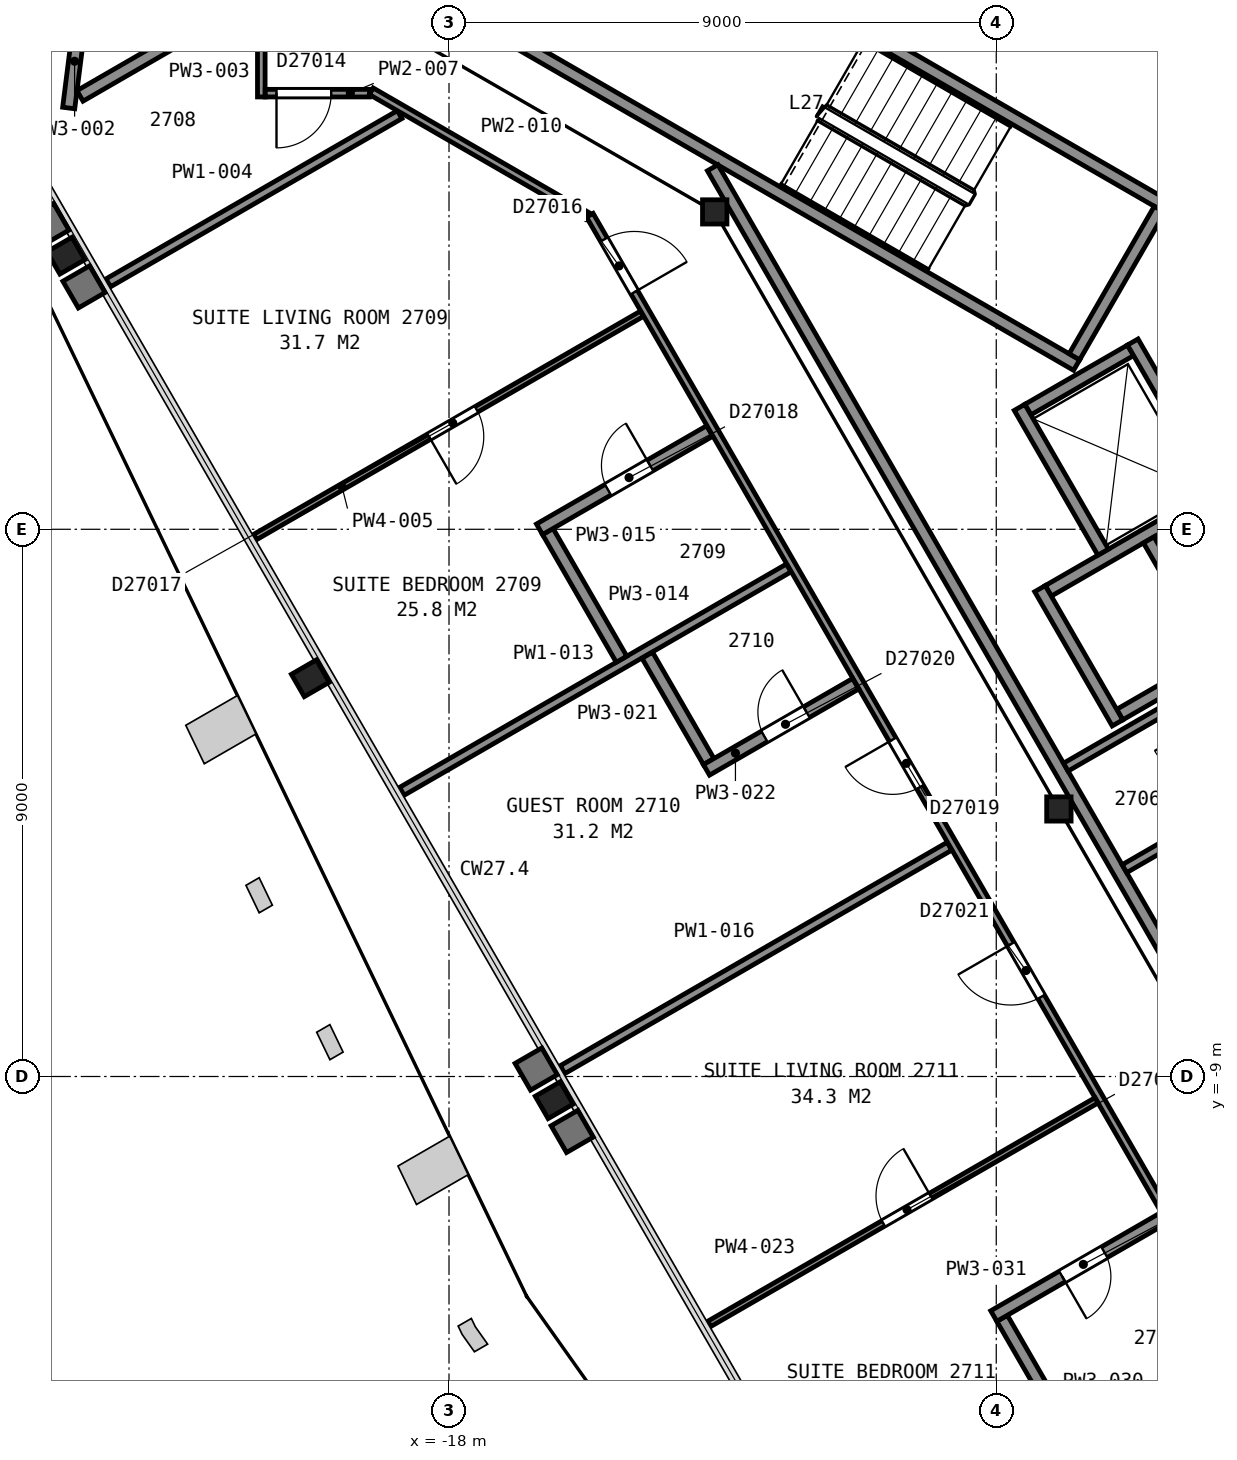
"""IFC4 building model, lengths in metres.
Left out: names, types, materials, properties, quantities, classifications, styles, units other than length and angle.
Written with IfcOpenShell. Run it as: python <this file> out.ifc"""

import sys

from ifc_helpers import new_model, si_unit, direction, frame, frame_2d, origin, origin_2d, place, context, subcontext, project, spatial, rectangle, i_section, extrude, element, fill, save


model = new_model("IFC4")
c1 = context("Model", 3, precision=1e-05, world=origin(), true_north=direction((0.0, 1.0)))
c2 = subcontext(c1, "Body", "Model", "MODEL_VIEW")
j1 = project(units=[si_unit("LENGTHUNIT", "METRE"), si_unit("PLANEANGLEUNIT", "RADIAN")], contexts=[c1])
p1 = place(None, origin())
s1 = spatial("IfcSite", under=j1, at=p1, CompositionType="ELEMENT")
p2 = place(p1, origin())
s2 = spatial("IfcBuilding", under=s1, at=p2, CompositionType="ELEMENT")
p3 = place(p2, frame((0.0, 0.0, 114.4)))
s3 = spatial("IfcBuildingStorey", under=s2, at=p3, CompositionType="ELEMENT", Elevation=114.4)
p4 = place(p3, frame((-24.3, 4.5, 0.0), z_axis=(0.0, 0.0, 1.0), x_axis=(-0.5, 0.866025403784, 0.0)))
e1 = element("IfcColumn", 1, at=p4, inside=s3, PredefinedType="COLUMN", context=c2, shape_type="SweptSolid", body=[
    extrude(i_section(OverallWidth=0.424, OverallDepth=0.475, WebThickness=0.048, FlangeThickness=0.077, FilletRadius=0.015, at=origin_2d()), origin(), (0.0, 0.0, 1.0), 3.555),
])
p5 = place(p3, frame((-20.28, -2.45, 0.0), z_axis=(0.0, 0.0, 1.0), x_axis=(-0.5, 0.866025403784, 0.0)))
e2 = element("IfcColumn", 2, at=p5, inside=s3, PredefinedType="COLUMN", context=c2, shape_type="SweptSolid", body=[
    extrude(i_section(OverallWidth=0.424, OverallDepth=0.475, WebThickness=0.048, FlangeThickness=0.077, FilletRadius=0.015, at=origin_2d()), origin(), (0.0, 0.0, 1.0), 3.56),
])
p6 = place(p3, frame((-16.27, -9.39, 0.0), z_axis=(0.0, 0.0, 1.0), x_axis=(-0.5, 0.866025403784, 0.0)))
e3 = element("IfcColumn", 3, at=p6, inside=s3, PredefinedType="COLUMN", context=c2, shape_type="SweptSolid", body=[
    extrude(i_section(OverallWidth=0.424, OverallDepth=0.475, WebThickness=0.048, FlangeThickness=0.077, FilletRadius=0.015, at=origin_2d()), origin(), (0.0, 0.0, 1.0), 3.565),
])
for number, where, z_axis, x_axis in (
    (4, (-13.63, 5.22, 0.0), (0.0, 0.0, 1.0), (1.0, 0.0, 0.0)),
    (5, (-7.97, -4.6, 0.0), (0.0, 0.0, 1.0), (1.0, 0.0, 0.0)),
):
    element("IfcColumn", number, at=place(p3, frame(where, z_axis=z_axis, x_axis=x_axis)), inside=s3, PredefinedType="COLUMN", context=c2, shape_type="SweptSolid", body=[
        extrude(i_section(OverallWidth=0.401, OverallDepth=0.399, WebThickness=0.025, FlangeThickness=0.04, FilletRadius=0.015, at=origin_2d()), origin(), (0.0, 0.0, 1.0), 3.6),
    ])
for number, where, z_axis, x_axis in (
    (6, (-7.678, 2.701, 0.0), (0.0, 0.0, 1.0), (-0.866, 0.5, 0.0)),
    (7, (-6.178, 5.299, 0.0), (0.0, 0.0, 1.0), (-0.866, 0.5, 0.0)),
):
    element("IfcWall", number, at=place(p3, frame(where, z_axis=z_axis, x_axis=x_axis)), inside=s3, PredefinedType="PARTITIONING", context=c2, shape_type="SweptSolid", body=[
        extrude(rectangle(XDim=12.0, YDim=0.2, at=frame_2d((6.0, 0.0))), origin(), (0.0, 0.0, 1.0), 3.35),
    ])
p7 = place(p3, frame((-6.315, 5.262, 0.0), z_axis=(0.0, 0.0, 1.0), x_axis=(-0.500049511043, -0.865996816683, 0.0)))
e8 = element("IfcWall", 8, at=p7, inside=s3, PredefinedType="PARTITIONING", context=c2, shape_type="SweptSolid", body=[
    extrude(rectangle(XDim=2.8, YDim=0.2, at=frame_2d((1.4, 0.0))), origin(), (0.0, 0.0, 1.0), 3.35),
])
p8 = place(p3, frame((-6.97, -3.048, 0.0), z_axis=(0.0, 0.0, 1.0), x_axis=(0.866036909293, 0.499980071345, 0.0)))
e9 = element("IfcWall", 9, at=p8, inside=s3, PredefinedType="PARTITIONING", context=c2, shape_type="SweptSolid", body=[
    extrude(rectangle(XDim=1.75, YDim=0.2, at=frame_2d((0.875, 0.0))), origin(), (0.0, 0.0, 1.0), 3.6),
])
p9 = place(p3, frame((-8.145, -1.013, 0.0), z_axis=(0.0, 0.0, 1.0), x_axis=(0.866016494683, 0.500015430699, 0.0)))
e10 = element("IfcWall", 10, at=p9, inside=s3, PredefinedType="PARTITIONING", context=c2, shape_type="SweptSolid", body=[
    extrude(rectangle(XDim=3.15, YDim=0.2, at=frame_2d((1.575, 0.0))), origin(), (0.0, 0.0, 1.0), 3.6),
])
p10 = place(p3, frame((-8.48, 1.969, 0.0), z_axis=(0.0, 0.0, 1.0), x_axis=(0.866000020948, 0.500043961785, 0.0)))
e11 = element("IfcWall", 11, at=p10, inside=s3, PredefinedType="PARTITIONING", context=c2, shape_type="SweptSolid", body=[
    extrude(rectangle(XDim=1.95, YDim=0.2, at=frame_2d((0.975, 0.0))), origin(), (0.0, 0.0, 1.0), 3.6),
])
p11 = place(p3, frame((-5.28, 0.525, 0.0), z_axis=(0.0, 0.0, 1.0), x_axis=(-0.500037662692, 0.866003658127, 0.0)))
e12 = element("IfcWall", 12, at=p11, inside=s3, PredefinedType="PARTITIONING", context=c2, shape_type="SweptSolid", body=[
    extrude(rectangle(XDim=2.95, YDim=0.2, at=frame_2d((1.475, 0.0))), origin(), (0.0, 0.0, 1.0), 3.6),
])
p12 = place(p11, frame((0.925, 0.0, 0.0)))
e13 = element("IfcOpeningElement", 13, at=p12, cuts=e12, PredefinedType="OPENING", context=c2, shape_type="SweptSolid", body=[
    extrude(rectangle(XDim=1.1, YDim=2.1, at=frame_2d((0.55, 1.05))), frame((0.0, 0.11, 0.0), z_axis=(0.0, -1.0, 0.0), x_axis=(1.0, 0.0, 0.0)), (0.0, 0.0, 1.0), 0.22),
])
p13 = place(p3, frame((-5.318, -2.21, 0.0), z_axis=(0.0, 0.0, 1.0), x_axis=(-0.499938297808, 0.866061024631, 0.0)))
e14 = element("IfcWall", 14, at=p13, inside=s3, PredefinedType="PARTITIONING", context=c2, shape_type="SweptSolid", body=[
    extrude(rectangle(XDim=2.35, YDim=0.2, at=frame_2d((1.175, 0.0))), origin(), (0.0, 0.0, 1.0), 3.6),
])
p14 = place(p3, frame((-7.242, -0.376, 0.0), z_axis=(0.0, 0.0, 1.0), x_axis=(-0.499996545922, 0.866027397988, 0.0)))
e15 = element("IfcWall", 15, at=p14, inside=s3, PredefinedType="PARTITIONING", context=c2, shape_type="SweptSolid", body=[
    extrude(rectangle(XDim=2.75, YDim=0.2, at=frame_2d((1.375, 0.0))), origin(), (0.0, 0.0, 1.0), 3.6),
])
p15 = place(p3, frame((-7.006, -3.185, 0.0), z_axis=(0.0, 0.0, 1.0), x_axis=(-0.499990435942, 0.866030925526, 0.0)))
e16 = element("IfcWall", 16, at=p15, inside=s3, PredefinedType="PARTITIONING", context=c2, shape_type="SweptSolid", body=[
    extrude(rectangle(XDim=2.55, YDim=0.2, at=frame_2d((1.275, 0.0))), origin(), (0.0, 0.0, 1.0), 3.6),
])
p16 = place(p3, frame((-13.664, 5.946, 0.0), z_axis=(0.0, 0.0, 1.0), x_axis=(0.499994327219, -0.866028678941, 0.0)))
e17 = element("IfcWall", 17, at=p16, inside=s3, PredefinedType="PARTITIONING", context=c2, shape_type="SweptSolid", body=[
    extrude(rectangle(XDim=23.968, YDim=0.2, at=frame_2d((11.984, 0.0))), origin(), (0.0, 0.0, 1.0), 3.35),
])
p17 = place(p3, frame((-7.856, -3.912, 0.0), z_axis=(0.0, 0.0, 1.0), x_axis=(0.865971748, 0.500092923031, 0.0)))
e18 = element("IfcWall", 18, at=p17, inside=s3, PredefinedType="PARTITIONING", context=c2, shape_type="SweptSolid", body=[
    extrude(rectangle(XDim=2.225, YDim=0.15, at=frame_2d((1.112, 0.0))), origin(), (0.0, 0.0, 1.0), 3.35),
])
p18 = place(p3, frame((-6.892, -5.582, 0.0), z_axis=(0.0, 0.0, 1.0), x_axis=(0.865944298464, 0.500140452231, 0.0)))
e19 = element("IfcWall", 19, at=p18, inside=s3, PredefinedType="PARTITIONING", context=c2, shape_type="SweptSolid", body=[
    extrude(rectangle(XDim=2.224, YDim=0.15, at=frame_2d((1.112, 0.0))), origin(), (0.0, 0.0, 1.0), 3.35),
])
p19 = place(p3, frame((-23.79, 10.596, 0.0), z_axis=(0.0, 0.0, 1.0), x_axis=(-0.125611452306, -0.992079514479, 0.0)))
e20 = element("IfcWall", 20, at=p19, inside=s3, PredefinedType="PARTITIONING", context=c2, shape_type="SweptSolid", body=[
    extrude(rectangle(XDim=3.697, YDim=0.2, at=frame_2d((1.848, 0.0))), origin(), (0.0, 0.0, 1.0), 2.613),
])
p20 = place(p19, frame((1.247, 0.0, 0.0)))
e21 = element("IfcOpeningElement", 21, at=p20, cuts=e20, PredefinedType="OPENING", context=c2, shape_type="SweptSolid", body=[
    extrude(rectangle(XDim=0.9, YDim=2.1, at=frame_2d((0.45, 1.05))), frame((0.0, 0.11, 0.0), z_axis=(0.0, -1.0, 0.0), x_axis=(1.0, 0.0, 0.0)), (0.0, 0.0, 1.0), 0.22),
])
p21 = place(p3, frame((-24.069, 7.128, 0.0), z_axis=(0.0, 0.0, 1.0), x_axis=(0.865980660237, 0.50007749009, 0.0)))
e22 = element("IfcWall", 22, at=p21, inside=s3, PredefinedType="PARTITIONING", context=c2, shape_type="SweptSolid", body=[
    extrude(rectangle(XDim=3.313, YDim=0.2, at=frame_2d((1.657, 0.0))), origin(), (0.0, 0.0, 1.0), 2.613),
])
p22 = place(p3, frame((-23.604, 4.053, 0.0), z_axis=(0.0, 0.0, 1.0), x_axis=(0.865961466541, 0.500110726206, 0.0)))
e23 = element("IfcWall", 23, at=p22, inside=s3, PredefinedType="PARTITIONING", context=c2, shape_type="SweptSolid", body=[
    extrude(rectangle(XDim=5.533, YDim=0.15, at=frame_2d((2.767, 0.0))), origin(), (0.0, 0.0, 1.0), 2.613),
])
p23 = place(p3, frame((-14.826, 3.545, 0.0), z_axis=(0.0, 0.0, 1.0), x_axis=(-0.866063309627, -0.499934339407, 0.0)))
e24 = element("IfcWall", 24, at=p23, inside=s3, PredefinedType="PARTITIONING", context=c2, shape_type="SweptSolid", body=[
    extrude(rectangle(XDim=7.348, YDim=0.1, at=frame_2d((3.674, 0.0))), origin(), (0.0, 0.0, 1.0), 2.613),
])
p24 = place(p23, frame((3.143, 0.0, 0.0)))
e25 = element("IfcOpeningElement", 25, at=p24, cuts=e24, PredefinedType="OPENING", context=c2, shape_type="SweptSolid", body=[
    extrude(rectangle(XDim=0.9, YDim=2.1, at=frame_2d((0.45, 1.05))), frame((0.0, 0.06, 0.0), z_axis=(0.0, -1.0, 0.0), x_axis=(1.0, 0.0, 0.0)), (0.0, 0.0, 1.0), 0.12),
])
p25 = place(p3, frame((-21.087, 7.111, 0.0), z_axis=(0.0, 0.0, 1.0), x_axis=(0.0, 1.0, 0.0)))
e26 = element("IfcWall", 26, at=p25, inside=s3, PredefinedType="PARTITIONING", context=c2, shape_type="SweptSolid", body=[
    extrude(rectangle(XDim=3.099, YDim=0.125, at=frame_2d((1.549, 0.0))), origin(), (0.0, 0.0, 1.0), 2.613),
])
p26 = place(p3, frame((-19.309, 7.173, 0.0), z_axis=(0.0, 0.0, 1.0), x_axis=(-1.0, 0.0, 0.0)))
e27 = element("IfcWall", 27, at=p26, inside=s3, PredefinedType="PARTITIONING", context=c2, shape_type="SweptSolid", body=[
    extrude(rectangle(XDim=1.713, YDim=0.125, at=frame_2d((0.856, 0.0))), origin(), (0.0, 0.0, 1.0), 2.613),
])
p27 = place(p26, frame((0.628, 0.0, 0.0)))
e28 = element("IfcOpeningElement", 28, at=p27, cuts=e27, PredefinedType="OPENING", context=c2, shape_type="SweptSolid", body=[
    extrude(rectangle(XDim=0.9, YDim=2.1, at=frame_2d((0.45, 1.05))), frame((0.0, 0.073, 0.0), z_axis=(0.0, -1.0, 0.0), x_axis=(1.0, 0.0, 0.0)), (0.0, 0.0, 1.0), 0.145),
])
p28 = place(p3, frame((-19.278, 7.204, 0.0), z_axis=(0.0, 0.0, 1.0), x_axis=(0.865992261418, -0.50005739987, 0.0)))
e29 = element("IfcWall", 29, at=p28, inside=s3, PredefinedType="PARTITIONING", context=c2, shape_type="SweptSolid", body=[
    extrude(rectangle(XDim=4.101, YDim=0.125, at=frame_2d((2.051, 0.0))), origin(), (0.0, 0.0, 1.0), 2.613),
])
p29 = place(p3, frame((-18.775, -4.31, 0.0), z_axis=(0.0, 0.0, 1.0), x_axis=(0.866003534372, 0.50003787702, 0.0)))
e30 = element("IfcWall", 30, at=p29, inside=s3, PredefinedType="PARTITIONING", context=c2, shape_type="SweptSolid", body=[
    extrude(rectangle(XDim=7.348, YDim=0.15, at=frame_2d((3.674, 0.0))), origin(), (0.0, 0.0, 1.0), 2.613),
])
p30 = place(p3, frame((-16.375, -0.037, 0.0), z_axis=(0.0, 0.0, 1.0), x_axis=(0.499928696113, -0.866066567189, 0.0)))
e31 = element("IfcWall", 31, at=p30, inside=s3, PredefinedType="PARTITIONING", context=c2, shape_type="SweptSolid", body=[
    extrude(rectangle(XDim=2.425, YDim=0.2, at=frame_2d((1.212, 0.0))), origin(), (0.0, 0.0, 1.0), 2.613),
])
p31 = place(p3, frame((-13.712, 1.616, 0.0), z_axis=(0.0, 0.0, 1.0), x_axis=(-0.866022073929, -0.500005767435, 0.0)))
e32 = element("IfcWall", 32, at=p31, inside=s3, PredefinedType="PARTITIONING", context=c2, shape_type="SweptSolid", body=[
    extrude(rectangle(XDim=3.232, YDim=0.2, at=frame_2d((1.616, 0.0))), origin(), (0.0, 0.0, 1.0), 2.613),
])
p32 = place(p31, frame((1.132, 0.0, 0.0)))
e33 = element("IfcOpeningElement", 33, at=p32, cuts=e32, PredefinedType="OPENING", context=c2, shape_type="SweptSolid", body=[
    extrude(rectangle(XDim=0.8, YDim=2.1, at=frame_2d((0.4, 1.05))), frame((0.0, 0.11, 0.0), z_axis=(0.0, -1.0, 0.0), x_axis=(1.0, 0.0, 0.0)), (0.0, 0.0, 1.0), 0.22),
])
p33 = place(p3, frame((-16.133, -8.887, 0.0), z_axis=(0.0, 0.0, 1.0), x_axis=(0.865997454095, 0.500048407157, 0.0)))
e34 = element("IfcWall", 34, at=p33, inside=s3, PredefinedType="PARTITIONING", context=c2, shape_type="SweptSolid", body=[
    extrude(rectangle(XDim=7.348, YDim=0.15, at=frame_2d((3.674, 0.0))), origin(), (0.0, 0.0, 1.0), 2.613),
])
p34 = place(p3, frame((-3.756, -15.494, 0.0), z_axis=(0.0, 0.0, 1.0), x_axis=(-0.500027787016, 0.866009360349, 0.0)))
e35 = element("IfcWall", 35, at=p34, inside=s3, PredefinedType="PARTITIONING", context=c2, shape_type="SweptSolid", body=[
    extrude(rectangle(XDim=23.856, YDim=0.125, at=frame_2d((11.928, 0.0))), origin(), (0.0, 0.0, 1.0), 2.613),
])
p35 = place(p34, frame((22.393, 0.0, 0.0)))
e36 = element("IfcOpeningElement", 36, at=p35, cuts=e35, PredefinedType="OPENING", context=c2, shape_type="SweptSolid", body=[
    extrude(rectangle(XDim=1.0, YDim=2.1, at=frame_2d((0.5, 1.05))), frame((0.0, 0.073, 0.0), z_axis=(0.0, -1.0, 0.0), x_axis=(1.0, 0.0, 0.0)), (0.0, 0.0, 1.0), 0.145),
])
p36 = place(p34, frame((12.996, 0.0, 0.0)))
e37 = element("IfcOpeningElement", 37, at=p36, cuts=e35, PredefinedType="OPENING", context=c2, shape_type="SweptSolid", body=[
    extrude(rectangle(XDim=0.9, YDim=2.1, at=frame_2d((0.45, 1.05))), frame((0.0, 0.073, 0.0), z_axis=(0.0, -1.0, 0.0), x_axis=(1.0, 0.0, 0.0)), (0.0, 0.0, 1.0), 0.145),
])
p37 = place(p34, frame((9.011, 0.0, 0.0)))
e38 = element("IfcOpeningElement", 38, at=p37, cuts=e35, PredefinedType="OPENING", context=c2, shape_type="SweptSolid", body=[
    extrude(rectangle(XDim=1.0, YDim=2.1, at=frame_2d((0.5, 1.05))), frame((0.0, 0.073, 0.0), z_axis=(0.0, -1.0, 0.0), x_axis=(1.0, 0.0, 0.0)), (0.0, 0.0, 1.0), 0.145),
])
p38 = place(p3, frame((-14.739, -2.071, 0.0), z_axis=(0.0, 0.0, 1.0), x_axis=(0.500078207394, -0.865980246016, 0.0)))
e39 = element("IfcWall", 39, at=p38, inside=s3, PredefinedType="PARTITIONING", context=c2, shape_type="SweptSolid", body=[
    extrude(rectangle(XDim=2.02, YDim=0.2, at=frame_2d((1.01, 0.0))), origin(), (0.0, 0.0, 1.0), 2.613),
])
p39 = place(p3, frame((-13.766, -3.957, 0.0), z_axis=(0.0, 0.0, 1.0), x_axis=(0.866033446572, 0.499986069224, 0.0)))
e40 = element("IfcWall", 40, at=p39, inside=s3, PredefinedType="PARTITIONING", context=c2, shape_type="SweptSolid", body=[
    extrude(rectangle(XDim=2.833, YDim=0.2, at=frame_2d((1.416, 0.0))), origin(), (0.0, 0.0, 1.0), 2.613),
])
p40 = place(p39, frame((1.1, 0.0, 0.0)))
e41 = element("IfcOpeningElement", 41, at=p40, cuts=e40, PredefinedType="OPENING", context=c2, shape_type="SweptSolid", body=[
    extrude(rectangle(XDim=0.8, YDim=2.1, at=frame_2d((0.4, 1.05))), frame((0.0, 0.11, 0.0), z_axis=(0.0, -1.0, 0.0), x_axis=(1.0, 0.0, 0.0)), (0.0, 0.0, 1.0), 0.22),
])
p41 = place(p3, frame((-7.351, -9.392, 0.0), z_axis=(0.0, 0.0, 1.0), x_axis=(-0.8660606245, -0.499938990969, 0.0)))
e42 = element("IfcWall", 42, at=p41, inside=s3, PredefinedType="PARTITIONING", context=c2, shape_type="SweptSolid", body=[
    extrude(rectangle(XDim=7.353, YDim=0.1, at=frame_2d((3.676, 0.0))), origin(), (0.0, 0.0, 1.0), 2.613),
])
p42 = place(p41, frame((3.148, 0.0, 0.0)))
e43 = element("IfcOpeningElement", 43, at=p42, cuts=e42, PredefinedType="OPENING", context=c2, shape_type="SweptSolid", body=[
    extrude(rectangle(XDim=0.9, YDim=2.1, at=frame_2d((0.45, 1.05))), frame((0.0, 0.06, 0.0), z_axis=(0.0, -1.0, 0.0), x_axis=(1.0, 0.0, 0.0)), (0.0, 0.0, 1.0), 0.12),
])
p43 = place(p3, frame((-11.304, -17.25, 0.0), z_axis=(0.0, 0.0, 1.0), x_axis=(0.86600919026, 0.500028081597, 0.0)))
e44 = element("IfcWall", 44, at=p43, inside=s3, PredefinedType="PARTITIONING", context=c2, shape_type="SweptSolid", body=[
    extrude(rectangle(XDim=7.353, YDim=0.15, at=frame_2d((3.676, 0.0))), origin(), (0.0, 0.0, 1.0), 2.613),
])
p44 = place(p3, frame((-8.904, -12.977, 0.0), z_axis=(0.0, 0.0, 1.0), x_axis=(0.499960613912, -0.866048142159, 0.0)))
e45 = element("IfcWall", 45, at=p44, inside=s3, PredefinedType="PARTITIONING", context=c2, shape_type="SweptSolid", body=[
    extrude(rectangle(XDim=2.426, YDim=0.2, at=frame_2d((1.213, 0.0))), origin(), (0.0, 0.0, 1.0), 2.613),
])
p45 = place(p3, frame((-6.241, -11.324, 0.0), z_axis=(0.0, 0.0, 1.0), x_axis=(-0.866003189247, -0.500038474733, 0.0)))
e46 = element("IfcWall", 46, at=p45, inside=s3, PredefinedType="PARTITIONING", context=c2, shape_type="SweptSolid", body=[
    extrude(rectangle(XDim=3.232, YDim=0.2, at=frame_2d((1.616, 0.0))), origin(), (0.0, 0.0, 1.0), 2.613),
])
p46 = place(p45, frame((1.132, 0.0, 0.0)))
e47 = element("IfcOpeningElement", 47, at=p46, cuts=e46, PredefinedType="OPENING", context=c2, shape_type="SweptSolid", body=[
    extrude(rectangle(XDim=0.8, YDim=2.1, at=frame_2d((0.4, 1.05))), frame((0.0, 0.11, 0.0), z_axis=(0.0, -1.0, 0.0), x_axis=(1.0, 0.0, 0.0)), (0.0, 0.0, 1.0), 0.22),
])
p47 = place(p24, origin())
e48 = element("IfcDoor", 48, at=p47, inside=s3, OperationType="SINGLE_SWING_RIGHT", PredefinedType="DOOR", context=c2, shape_type="SweptSolid", body=[
    extrude(rectangle(XDim=0.9, YDim=2.1, at=frame_2d((0.45, 1.05))), frame((0.0, 0.025, 0.0), z_axis=(0.0, -1.0, 0.0), x_axis=(1.0, 0.0, 0.0)), (0.0, 0.0, 1.0), 0.05),
])
fill(e25, e48)
p48 = place(p27, origin())
e49 = element("IfcDoor", 49, at=p48, inside=s3, OperationType="SINGLE_SWING_RIGHT", PredefinedType="DOOR", context=c2, shape_type="SweptSolid", body=[
    extrude(rectangle(XDim=0.9, YDim=2.1, at=frame_2d((0.45, 1.05))), frame((0.0, 0.025, 0.0), z_axis=(0.0, -1.0, 0.0), x_axis=(1.0, 0.0, 0.0)), (0.0, 0.0, 1.0), 0.05),
])
fill(e28, e49)
p49 = place(p32, origin())
e50 = element("IfcDoor", 50, at=p49, inside=s3, OperationType="SINGLE_SWING_LEFT", PredefinedType="DOOR", context=c2, shape_type="SweptSolid", body=[
    extrude(rectangle(XDim=0.8, YDim=2.1, at=frame_2d((0.4, 1.05))), frame((0.0, 0.025, 0.0), z_axis=(0.0, -1.0, 0.0), x_axis=(1.0, 0.0, 0.0)), (0.0, 0.0, 1.0), 0.05),
])
fill(e33, e50)
p50 = place(p35, origin())
e51 = element("IfcDoor", 51, at=p50, inside=s3, OperationType="SINGLE_SWING_LEFT", PredefinedType="DOOR", context=c2, shape_type="SweptSolid", body=[
    extrude(rectangle(XDim=1.0, YDim=2.1, at=frame_2d((0.5, 1.05))), frame((0.0, 0.025, 0.0), z_axis=(0.0, -1.0, 0.0), x_axis=(1.0, 0.0, 0.0)), (0.0, 0.0, 1.0), 0.05),
])
fill(e36, e51)
p51 = place(p36, origin())
e52 = element("IfcDoor", 52, at=p51, inside=s3, OperationType="SINGLE_SWING_RIGHT", PredefinedType="DOOR", context=c2, shape_type="SweptSolid", body=[
    extrude(rectangle(XDim=0.9, YDim=2.1, at=frame_2d((0.45, 1.05))), frame((0.0, 0.025, 0.0), z_axis=(0.0, -1.0, 0.0), x_axis=(1.0, 0.0, 0.0)), (0.0, 0.0, 1.0), 0.05),
])
fill(e37, e52)
p52 = place(p37, origin())
e53 = element("IfcDoor", 53, at=p52, inside=s3, OperationType="SINGLE_SWING_RIGHT", PredefinedType="DOOR", context=c2, shape_type="SweptSolid", body=[
    extrude(rectangle(XDim=1.0, YDim=2.1, at=frame_2d((0.5, 1.05))), frame((0.0, 0.025, 0.0), z_axis=(0.0, -1.0, 0.0), x_axis=(1.0, 0.0, 0.0)), (0.0, 0.0, 1.0), 0.05),
])
fill(e38, e53)
p53 = place(p40, origin())
e54 = element("IfcDoor", 54, at=p53, inside=s3, OperationType="SINGLE_SWING_RIGHT", PredefinedType="DOOR", context=c2, shape_type="SweptSolid", body=[
    extrude(rectangle(XDim=0.8, YDim=2.1, at=frame_2d((0.4, 1.05))), frame((0.0, 0.025, 0.0), z_axis=(0.0, -1.0, 0.0), x_axis=(1.0, 0.0, 0.0)), (0.0, 0.0, 1.0), 0.05),
])
fill(e41, e54)
p54 = place(p42, origin())
e55 = element("IfcDoor", 55, at=p54, inside=s3, OperationType="SINGLE_SWING_LEFT", PredefinedType="DOOR", context=c2, shape_type="SweptSolid", body=[
    extrude(rectangle(XDim=0.9, YDim=2.1, at=frame_2d((0.45, 1.05))), frame((0.0, 0.025, 0.0), z_axis=(0.0, -1.0, 0.0), x_axis=(1.0, 0.0, 0.0)), (0.0, 0.0, 1.0), 0.05),
])
fill(e43, e55)
p55 = place(p46, origin())
e56 = element("IfcDoor", 56, at=p55, inside=s3, OperationType="SINGLE_SWING_RIGHT", PredefinedType="DOOR", context=c2, shape_type="SweptSolid", body=[
    extrude(rectangle(XDim=0.8, YDim=2.1, at=frame_2d((0.4, 1.05))), frame((0.0, 0.025, 0.0), z_axis=(0.0, -1.0, 0.0), x_axis=(1.0, 0.0, 0.0)), (0.0, 0.0, 1.0), 0.05),
])
fill(e47, e56)
save(model, sys.argv[1])
